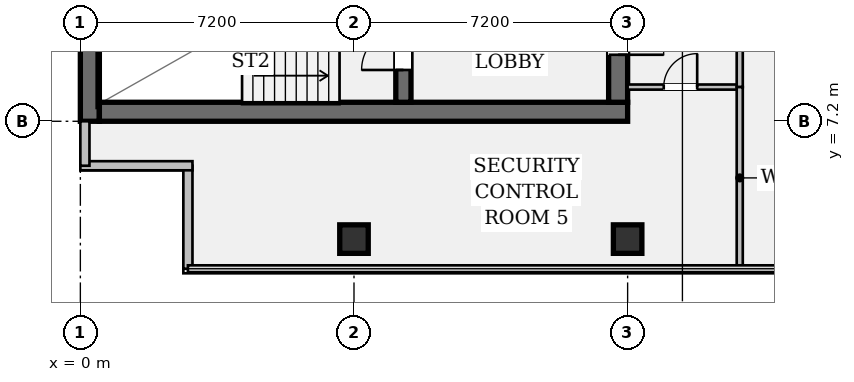
"""IFC4 building model, lengths in metres.
Left out: names, types, materials, properties, quantities, classifications, styles, units other than length and angle.
Written with IfcOpenShell. Run it as: python <this file> out.ifc"""

import sys

from ifc_helpers import new_model, si_unit, direction, frame, frame_2d, origin, origin_2d, place, context, subcontext, project, spatial, rectangle, hollow_rectangle, extrude, element, fill, save


model = new_model("IFC4")
c1 = context("Model", 3, precision=1e-05, world=origin(), true_north=direction((0.0, 1.0)))
c2 = subcontext(c1, "Body", "Model", "MODEL_VIEW")
j1 = project(units=[si_unit("LENGTHUNIT", "METRE"), si_unit("PLANEANGLEUNIT", "RADIAN")], contexts=[c1])
p1 = place(None, origin())
s1 = spatial("IfcSite", under=j1, at=p1, CompositionType="ELEMENT")
p2 = place(p1, origin())
s2 = spatial("IfcBuilding", under=s1, at=p2, CompositionType="ELEMENT")
p3 = place(p2, frame((0.0, 0.0, 225.75)))
s3 = spatial("IfcBuildingStorey", under=s2, at=p3, CompositionType="ELEMENT", Elevation=225.75)
p4 = place(p3, frame((0.25, 7.2, 0.0), z_axis=(0.0, 0.0, 1.0), x_axis=(0.0, 1.0, 0.0)))
e1 = element("IfcWall", 1, at=p4, inside=s3, PredefinedType="SHEAR", context=c2, shape_type="SweptSolid", body=[
    extrude(rectangle(XDim=28.8, YDim=0.5, at=frame_2d((14.4, 0.0))), origin(), (0.0, 0.0, 1.0), 3.24),
])
p5 = place(p3, frame((0.5, 7.45, 0.0), z_axis=(0.0, 0.0, 1.0), x_axis=(1.0, 0.0, 0.0)))
e2 = element("IfcWall", 2, at=p5, inside=s3, PredefinedType="SHEAR", context=c2, shape_type="SweptSolid", body=[
    extrude(rectangle(XDim=13.9, YDim=0.5, at=frame_2d((6.95, 0.0))), origin(), (0.0, 0.0, 1.0), 3.24),
])
p6 = place(p3, frame((14.15, 35.5, 0.0), z_axis=(0.0, 0.0, 1.0), x_axis=(0.0, -1.0, 0.0)))
e3 = element("IfcWall", 3, at=p6, inside=s3, PredefinedType="SHEAR", context=c2, shape_type="SweptSolid", body=[
    extrude(rectangle(XDim=27.8, YDim=0.5, at=frame_2d((13.9, 0.0))), origin(), (0.0, 0.0, 1.0), 3.24),
])
p7 = place(p6, frame((1.4, 0.0, 0.0)))
e4 = element("IfcOpeningElement", 4, at=p7, cuts=e3, PredefinedType="OPENING", context=c2, shape_type="SweptSolid", body=[
    extrude(rectangle(XDim=1.2, YDim=2.15, at=frame_2d((0.6, 1.075))), frame((0.0, 0.262, 0.0), z_axis=(0.0, -1.0, 0.0), x_axis=(1.0, 0.0, 0.0)), (0.0, 0.0, 1.0), 0.524),
])
p8 = place(p6, frame((25.35, 0.0, 0.0)))
e5 = element("IfcOpeningElement", 5, at=p8, cuts=e3, PredefinedType="OPENING", context=c2, shape_type="SweptSolid", body=[
    extrude(rectangle(XDim=1.2, YDim=2.15, at=frame_2d((0.6, 1.075))), frame((0.0, 0.262, 0.0), z_axis=(0.0, -1.0, 0.0), x_axis=(1.0, 0.0, 0.0)), (0.0, 0.0, 1.0), 0.524),
])
p9 = place(p6, frame((14.7, 0.0, 0.0)))
e6 = element("IfcOpeningElement", 6, at=p9, cuts=e3, PredefinedType="OPENING", context=c2, shape_type="SweptSolid", body=[
    extrude(rectangle(XDim=1.6, YDim=2.2, at=frame_2d((0.8, 1.1))), frame((0.0, 0.262, 0.0), z_axis=(0.0, -1.0, 0.0), x_axis=(1.0, 0.0, 0.0)), (0.0, 0.0, 1.0), 0.524),
])
p10 = place(p3, frame((8.5, 7.7, 0.0), z_axis=(0.0, 0.0, 1.0), x_axis=(0.0, 1.0, 0.0)))
e7 = element("IfcWall", 7, at=p10, inside=s3, PredefinedType="SHEAR", context=c2, shape_type="SweptSolid", body=[
    extrude(rectangle(XDim=3.78, YDim=0.4, at=frame_2d((1.89, 0.0))), origin(), (0.0, 0.0, 1.0), 3.24),
])
p11 = place(p10, frame((0.85, 0.0, 0.0)))
e8 = element("IfcOpeningElement", 8, at=p11, cuts=e7, PredefinedType="OPENING", context=c2, shape_type="SweptSolid", body=[
    extrude(rectangle(XDim=1.1, YDim=2.15, at=frame_2d((0.55, 1.075))), frame((0.0, 0.212, 0.0), z_axis=(0.0, -1.0, 0.0), x_axis=(1.0, 0.0, 0.0)), (0.0, 0.0, 1.0), 0.424),
])
for number, where, z_axis, x_axis in (
    (9, (7.2, 4.1, 0.0), (0.0, 0.0, 1.0), (1.0, 0.0, 0.0)),
    (10, (14.4, 4.1, 0.0), (0.0, 0.0, 1.0), (1.0, 0.0, 0.0)),
):
    element("IfcColumn", number, at=place(p3, frame(where, z_axis=z_axis, x_axis=x_axis)), inside=s3, PredefinedType="COLUMN", context=c2, shape_type="SweptSolid", body=[
        extrude(hollow_rectangle(XDim=0.75, YDim=0.75, WallThickness=0.045, at=origin_2d()), origin(), (0.0, 0.0, 1.0), 3.24),
    ])
p12 = place(p3, frame((2.83, 3.32, 0.0), z_axis=(0.0, 0.0, 1.0), x_axis=(0.0, 1.0, 0.0)))
e11 = element("IfcWall", 11, at=p12, inside=s3, PredefinedType="STANDARD", context=c2, shape_type="SweptSolid", body=[
    extrude(rectangle(XDim=2.71, YDim=0.24, at=frame_2d((1.355, 0.0))), origin(), (0.0, 0.0, 1.0), 3.24),
])
p13 = place(p3, frame((2.95, 6.03, 0.0), z_axis=(0.0, 0.0, 1.0), x_axis=(-1.0, 0.0, 0.0)))
e12 = element("IfcWall", 12, at=p13, inside=s3, PredefinedType="STANDARD", context=c2, shape_type="SweptSolid", body=[
    extrude(rectangle(XDim=2.95, YDim=0.24, at=frame_2d((1.475, 0.0))), origin(), (0.0, 0.0, 1.0), 3.24),
])
p14 = place(p3, frame((0.12, 6.03, 0.0), z_axis=(0.0, 0.0, 1.0), x_axis=(0.0, 1.0, 0.0)))
e13 = element("IfcWall", 13, at=p14, inside=s3, PredefinedType="STANDARD", context=c2, shape_type="SweptSolid", body=[
    extrude(rectangle(XDim=1.17, YDim=0.24, at=frame_2d((0.585, 0.0))), origin(), (0.0, 0.0, 1.0), 3.24),
])
p15 = place(p3, frame((14.4, 8.1, 0.0), z_axis=(0.0, 0.0, 1.0), x_axis=(1.0, 0.0, 0.0)))
e14 = element("IfcWall", 14, at=p15, inside=s3, PredefinedType="PARTITIONING", context=c2, shape_type="SweptSolid", body=[
    extrude(rectangle(XDim=2.95, YDim=0.135, at=frame_2d((1.475, 0.0))), origin(), (0.0, 0.0, 1.0), 2.808),
])
p16 = place(p15, frame((0.95, 0.0, 0.0)))
e15 = element("IfcOpeningElement", 15, at=p16, cuts=e14, PredefinedType="OPENING", context=c2, shape_type="SweptSolid", body=[
    extrude(rectangle(XDim=0.88, YDim=2.15, at=frame_2d((0.44, 1.075))), frame((0.0, 0.08, 0.0), z_axis=(0.0, -1.0, 0.0), x_axis=(1.0, 0.0, 0.0)), (0.0, 0.0, 1.0), 0.159),
])
p17 = place(p3, frame((17.35, 8.1, 0.0), z_axis=(0.0, 0.0, 1.0), x_axis=(0.0, 1.0, 0.0)))
e16 = element("IfcWall", 16, at=p17, inside=s3, PredefinedType="PARTITIONING", context=c2, shape_type="SweptSolid", body=[
    extrude(rectangle(XDim=2.0, YDim=0.16, at=frame_2d((1.0, 0.0))), origin(), (0.0, 0.0, 1.0), 3.24),
])
p18 = place(p3, frame((17.35, 3.32, 0.0), z_axis=(0.0, 0.0, 1.0), x_axis=(0.0, 1.0, 0.0)))
e17 = element("IfcWall", 17, at=p18, inside=s3, PredefinedType="PARTITIONING", context=c2, shape_type="SweptSolid", body=[
    extrude(rectangle(XDim=4.78, YDim=0.16, at=frame_2d((2.39, 0.0))), origin(), (0.0, 0.0, 1.0), 2.613),
])
p19 = place(p11, origin())
e18 = element("IfcDoor", 18, at=p19, inside=s3, OperationType="SINGLE_SWING_LEFT", PredefinedType="DOOR", context=c2, shape_type="SweptSolid", body=[
    extrude(rectangle(XDim=1.1, YDim=2.15, at=frame_2d((0.55, 1.075))), frame((0.0, 0.025, 0.0), z_axis=(0.0, -1.0, 0.0), x_axis=(1.0, 0.0, 0.0)), (0.0, 0.0, 1.0), 0.05),
])
fill(e8, e18)
p20 = place(p8, origin())
e19 = element("IfcDoor", 19, at=p20, inside=s3, OperationType="SINGLE_SWING_RIGHT", PredefinedType="DOOR", context=c2, shape_type="SweptSolid", body=[
    extrude(rectangle(XDim=1.2, YDim=2.15, at=frame_2d((0.6, 1.075))), frame((0.0, 0.025, 0.0), z_axis=(0.0, -1.0, 0.0), x_axis=(1.0, 0.0, 0.0)), (0.0, 0.0, 1.0), 0.05),
])
fill(e5, e19)
p21 = place(p16, origin())
e20 = element("IfcDoor", 20, at=p21, inside=s3, OperationType="SINGLE_SWING_RIGHT", PredefinedType="DOOR", context=c2, shape_type="SweptSolid", body=[
    extrude(rectangle(XDim=0.88, YDim=2.15, at=frame_2d((0.44, 1.075))), frame((0.0, 0.025, 0.0), z_axis=(0.0, -1.0, 0.0), x_axis=(1.0, 0.0, 0.0)), (0.0, 0.0, 1.0), 0.05),
])
fill(e15, e20)
save(model, sys.argv[1])
